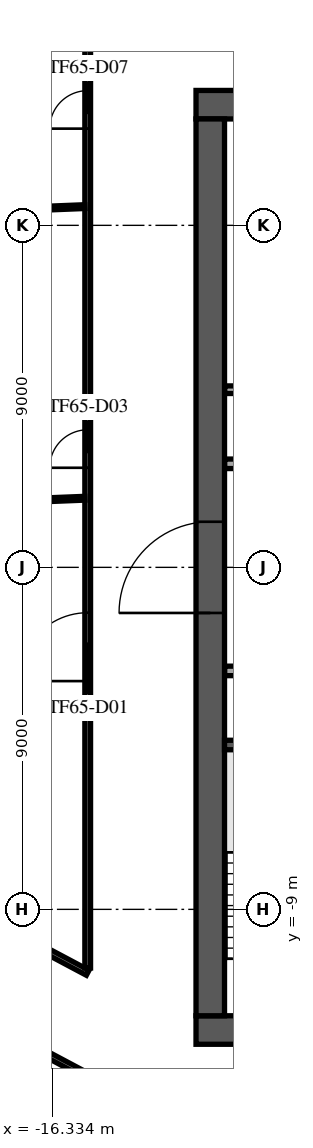
"""IFC4 building model, lengths in metres.
Left out: names, types, materials, properties, quantities, classifications, styles, units other than length and angle.
Written with IfcOpenShell. Run it as: python <this file> out.ifc"""

import sys

from ifc_helpers import new_model, si_unit, direction, frame, frame_2d, origin, place, context, subcontext, project, spatial, rectangle, extrude, element, fill, save


model = new_model("IFC4")
c1 = context("Model", 3, precision=1e-05, world=origin(), true_north=direction((0.0, 1.0)))
c2 = subcontext(c1, "Body", "Model", "MODEL_VIEW")
j1 = project(units=[si_unit("LENGTHUNIT", "METRE"), si_unit("PLANEANGLEUNIT", "RADIAN")], contexts=[c1])
p1 = place(None, origin())
s1 = spatial("IfcSite", under=j1, at=p1, CompositionType="ELEMENT")
p2 = place(p1, origin())
s2 = spatial("IfcBuilding", under=s1, at=p2, CompositionType="ELEMENT")
p3 = place(p2, frame((0.0, 0.0, 274.9)))
s3 = spatial("IfcBuildingStorey", under=s2, at=p3, CompositionType="ELEMENT", Elevation=274.9)
p4 = place(p3, frame((-12.55, 12.175, 0.0), z_axis=(0.0, 0.0, 1.0), x_axis=(1.0, 0.0, 0.0)))
e1 = element("IfcWall", 1, at=p4, inside=s3, PredefinedType="SHEAR", context=c2, shape_type="SweptSolid", body=[
    extrude(rectangle(XDim=25.1, YDim=0.75, at=frame_2d((12.55, 0.0))), origin(), (0.0, 0.0, 1.0), 3.64),
])
p5 = place(p4, frame((11.35, 0.0, 0.0)))
e2 = element("IfcOpeningElement", 2, at=p5, cuts=e1, PredefinedType="OPENING", context=c2, shape_type="SweptSolid", body=[
    extrude(rectangle(XDim=2.4, YDim=2.4, at=frame_2d((1.2, 1.2))), frame((0.0, 0.385, 0.0), z_axis=(0.0, -1.0, 0.0), x_axis=(1.0, 0.0, 0.0)), (0.0, 0.0, 1.0), 0.77),
])
p6 = place(p4, frame((22.175, 0.0, 0.0)))
e3 = element("IfcOpeningElement", 3, at=p6, cuts=e1, PredefinedType="OPENING", context=c2, shape_type="SweptSolid", body=[
    extrude(rectangle(XDim=1.2, YDim=2.1, at=frame_2d((0.6, 1.05))), frame((0.0, 0.385, 0.0), z_axis=(0.0, -1.0, 0.0), x_axis=(1.0, 0.0, 0.0)), (0.0, 0.0, 1.0), 0.77),
])
p7 = place(p4, frame((1.15, 0.0, 0.0)))
e4 = element("IfcOpeningElement", 4, at=p7, cuts=e1, PredefinedType="OPENING", context=c2, shape_type="SweptSolid", body=[
    extrude(rectangle(XDim=1.0, YDim=2.1, at=frame_2d((0.5, 1.05))), frame((0.0, 0.385, 0.0), z_axis=(0.0, -1.0, 0.0), x_axis=(1.0, 0.0, 0.0)), (0.0, 0.0, 1.0), 0.77),
])
p8 = place(p3, frame((-12.55, -12.175, 0.0), z_axis=(0.0, 0.0, 1.0), x_axis=(1.0, 0.0, 0.0)))
e5 = element("IfcWall", 5, at=p8, inside=s3, PredefinedType="SHEAR", context=c2, shape_type="SweptSolid", body=[
    extrude(rectangle(XDim=25.1, YDim=0.75, at=frame_2d((12.55, 0.0))), origin(), (0.0, 0.0, 1.0), 3.64),
])
p9 = place(p8, frame((7.45, 0.0, 0.0)))
e6 = element("IfcOpeningElement", 6, at=p9, cuts=e5, PredefinedType="OPENING", context=c2, shape_type="SweptSolid", body=[
    extrude(rectangle(XDim=2.0, YDim=2.1, at=frame_2d((1.0, 1.05))), frame((0.0, 0.385, 0.0), z_axis=(0.0, -1.0, 0.0), x_axis=(1.0, 0.0, 0.0)), (0.0, 0.0, 1.0), 0.77),
])
p10 = place(p8, frame((17.575, 0.0, 0.0)))
e7 = element("IfcOpeningElement", 7, at=p10, cuts=e5, PredefinedType="OPENING", context=c2, shape_type="SweptSolid", body=[
    extrude(rectangle(XDim=1.2, YDim=2.1, at=frame_2d((0.6, 1.05))), frame((0.0, 0.385, 0.0), z_axis=(0.0, -1.0, 0.0), x_axis=(1.0, 0.0, 0.0)), (0.0, 0.0, 1.0), 0.77),
])
p11 = place(p8, frame((1.725, 0.0, 0.0)))
e8 = element("IfcOpeningElement", 8, at=p11, cuts=e5, PredefinedType="OPENING", context=c2, shape_type="SweptSolid", body=[
    extrude(rectangle(XDim=1.2, YDim=2.1, at=frame_2d((0.6, 1.05))), frame((0.0, 0.385, 0.0), z_axis=(0.0, -1.0, 0.0), x_axis=(1.0, 0.0, 0.0)), (0.0, 0.0, 1.0), 0.77),
])
p12 = place(p8, frame((22.175, 0.0, 0.0)))
e9 = element("IfcOpeningElement", 9, at=p12, cuts=e5, PredefinedType="OPENING", context=c2, shape_type="SweptSolid", body=[
    extrude(rectangle(XDim=1.2, YDim=2.1, at=frame_2d((0.6, 1.05))), frame((0.0, 0.385, 0.0), z_axis=(0.0, -1.0, 0.0), x_axis=(1.0, 0.0, 0.0)), (0.0, 0.0, 1.0), 0.77),
])
p13 = place(p3, frame((-12.175, -11.8, 0.0), z_axis=(0.0, 0.0, 1.0), x_axis=(0.0, 1.0, 0.0)))
e10 = element("IfcWall", 10, at=p13, inside=s3, PredefinedType="SHEAR", context=c2, shape_type="SweptSolid", body=[
    extrude(rectangle(XDim=23.6, YDim=0.75, at=frame_2d((11.8, 0.0))), origin(), (0.0, 0.0, 1.0), 3.64),
])
p14 = place(p13, frame((10.6, 0.0, 0.0)))
e11 = element("IfcOpeningElement", 11, at=p14, cuts=e10, PredefinedType="OPENING", context=c2, shape_type="SweptSolid", body=[
    extrude(rectangle(XDim=2.4, YDim=2.4, at=frame_2d((1.2, 1.2))), frame((0.0, 0.385, 0.0), z_axis=(0.0, -1.0, 0.0), x_axis=(1.0, 0.0, 0.0)), (0.0, 0.0, 1.0), 0.77),
])
p15 = place(p3, frame((-8.65, -4.675, 0.0), z_axis=(0.0, 0.0, 1.0), x_axis=(-1.0, 0.0, 0.0)))
e12 = element("IfcWall", 12, at=p15, inside=s3, PredefinedType="SOLIDWALL", context=c2, shape_type="SweptSolid", body=[
    extrude(rectangle(XDim=3.15, YDim=0.25, at=frame_2d((1.575, 0.0))), origin(), (0.0, 0.0, 1.0), 3.64),
])
p16 = place(p3, frame((-11.795, -2.725, 0.0), z_axis=(0.0, 0.0, 1.0), x_axis=(1.0, 0.0, 0.0)))
e13 = element("IfcWall", 13, at=p16, inside=s3, PredefinedType="PARTITIONING", context=c2, shape_type="SweptSolid", body=[
    extrude(rectangle(XDim=14.415, YDim=0.25, at=frame_2d((7.208, 0.0))), origin(), (0.0, 0.0, 1.0), 3.64),
])
p17 = place(p16, frame((1.295, 0.0, 0.0)))
e14 = element("IfcOpeningElement", 14, at=p17, cuts=e13, PredefinedType="OPENING", context=c2, shape_type="SweptSolid", body=[
    extrude(rectangle(XDim=1.0, YDim=2.1, at=frame_2d((0.5, 1.05))), frame((0.0, 0.135, 0.0), z_axis=(0.0, -1.0, 0.0), x_axis=(1.0, 0.0, 0.0)), (0.0, 0.0, 1.0), 0.27),
])
p18 = place(p16, frame((4.42, 0.0, 0.0)))
e15 = element("IfcOpeningElement", 15, at=p18, cuts=e13, PredefinedType="OPENING", context=c2, shape_type="SweptSolid", body=[
    extrude(rectangle(XDim=1.0, YDim=2.1, at=frame_2d((0.5, 1.05))), frame((0.0, 0.135, 0.0), z_axis=(0.0, -1.0, 0.0), x_axis=(1.0, 0.0, 0.0)), (0.0, 0.0, 1.0), 0.27),
])
p19 = place(p16, frame((9.92, 0.0, 0.0)))
e16 = element("IfcOpeningElement", 16, at=p19, cuts=e13, PredefinedType="OPENING", context=c2, shape_type="SweptSolid", body=[
    extrude(rectangle(XDim=1.0, YDim=2.1, at=frame_2d((0.5, 1.05))), frame((0.0, 0.135, 0.0), z_axis=(0.0, -1.0, 0.0), x_axis=(1.0, 0.0, 0.0)), (0.0, 0.0, 1.0), 0.27),
])
p20 = place(p3, frame((-11.795, 2.725, 0.0), z_axis=(0.0, 0.0, 1.0), x_axis=(1.0, 0.0, 0.0)))
e17 = element("IfcWall", 17, at=p20, inside=s3, PredefinedType="PARTITIONING", context=c2, shape_type="SweptSolid", body=[
    extrude(rectangle(XDim=23.59, YDim=0.25, at=frame_2d((11.795, 0.0))), origin(), (0.0, 0.0, 1.0), 3.64),
])
p21 = place(p20, frame((21.345, 0.0, 0.0)))
e18 = element("IfcOpeningElement", 18, at=p21, cuts=e17, PredefinedType="OPENING", context=c2, shape_type="SweptSolid", body=[
    extrude(rectangle(XDim=0.9, YDim=2.1, at=frame_2d((0.45, 1.05))), frame((0.0, 0.135, 0.0), z_axis=(0.0, -1.0, 0.0), x_axis=(1.0, 0.0, 0.0)), (0.0, 0.0, 1.0), 0.27),
])
p22 = place(p20, frame((1.345, 0.0, 0.0)))
e19 = element("IfcOpeningElement", 19, at=p22, cuts=e17, PredefinedType="OPENING", context=c2, shape_type="SweptSolid", body=[
    extrude(rectangle(XDim=0.9, YDim=2.1, at=frame_2d((0.45, 1.05))), frame((0.0, 0.135, 0.0), z_axis=(0.0, -1.0, 0.0), x_axis=(1.0, 0.0, 0.0)), (0.0, 0.0, 1.0), 0.27),
])
p23 = place(p20, frame((4.32, 0.0, 0.0)))
e20 = element("IfcOpeningElement", 20, at=p23, cuts=e17, PredefinedType="OPENING", context=c2, shape_type="SweptSolid", body=[
    extrude(rectangle(XDim=1.2, YDim=2.1, at=frame_2d((0.6, 1.05))), frame((0.0, 0.135, 0.0), z_axis=(0.0, -1.0, 0.0), x_axis=(1.0, 0.0, 0.0)), (0.0, 0.0, 1.0), 0.27),
])
p24 = place(p20, frame((15.42, 0.0, 0.0)))
e21 = element("IfcOpeningElement", 21, at=p24, cuts=e17, PredefinedType="OPENING", context=c2, shape_type="SweptSolid", body=[
    extrude(rectangle(XDim=1.0, YDim=2.1, at=frame_2d((0.5, 1.05))), frame((0.0, 0.135, 0.0), z_axis=(0.0, -1.0, 0.0), x_axis=(1.0, 0.0, 0.0)), (0.0, 0.0, 1.0), 0.27),
])
p25 = place(p3, frame((-11.795, 4.675, 0.0), z_axis=(0.0, 0.0, 1.0), x_axis=(1.0, 0.0, 0.0)))
e22 = element("IfcWall", 22, at=p25, inside=s3, PredefinedType="PARTITIONING", context=c2, shape_type="SweptSolid", body=[
    extrude(rectangle(XDim=3.645, YDim=0.2, at=frame_2d((1.823, 0.0))), origin(), (0.0, 0.0, 1.0), 3.64),
])
p26 = place(p3, frame((-9.159, 32.618, 0.0), z_axis=(0.0, 0.0, 1.0), x_axis=(-0.469470468388, -0.88294817476, 0.0)))
e23 = element("IfcWall", 23, at=p26, inside=s3, PredefinedType="STANDARD", context=c2, shape_type="SweptSolid", body=[
    extrude(rectangle(XDim=48.843, YDim=0.6, at=frame_2d((24.422, 0.0))), origin(), (0.0, 0.0, 1.0), 3.64),
])
p27 = place(p26, frame((1.22, 0.0, 0.9)))
e24 = element("IfcOpeningElement", 24, at=p27, cuts=e23, PredefinedType="OPENING", context=c2, shape_type="SweptSolid", body=[
    extrude(rectangle(XDim=2.0, YDim=2.1, at=frame_2d((1.0, 1.05))), frame((0.0, 0.31, 0.0), z_axis=(0.0, -1.0, 0.0), x_axis=(1.0, 0.0, 0.0)), (0.0, 0.0, 1.0), 0.62),
])
p28 = place(p26, frame((5.66, 0.0, 0.9)))
e25 = element("IfcOpeningElement", 25, at=p28, cuts=e23, PredefinedType="OPENING", context=c2, shape_type="SweptSolid", body=[
    extrude(rectangle(XDim=2.0, YDim=2.1, at=frame_2d((1.0, 1.05))), frame((0.0, 0.31, 0.0), z_axis=(0.0, -1.0, 0.0), x_axis=(1.0, 0.0, 0.0)), (0.0, 0.0, 1.0), 0.62),
])
p29 = place(p26, frame((10.101, 0.0, 0.9)))
e26 = element("IfcOpeningElement", 26, at=p29, cuts=e23, PredefinedType="OPENING", context=c2, shape_type="SweptSolid", body=[
    extrude(rectangle(XDim=2.0, YDim=2.1, at=frame_2d((1.0, 1.05))), frame((0.0, 0.31, 0.0), z_axis=(0.0, -1.0, 0.0), x_axis=(1.0, 0.0, 0.0)), (0.0, 0.0, 1.0), 0.62),
])
p30 = place(p26, frame((14.541, 0.0, 0.9)))
e27 = element("IfcOpeningElement", 27, at=p30, cuts=e23, PredefinedType="OPENING", context=c2, shape_type="SweptSolid", body=[
    extrude(rectangle(XDim=2.0, YDim=2.1, at=frame_2d((1.0, 1.05))), frame((0.0, 0.31, 0.0), z_axis=(0.0, -1.0, 0.0), x_axis=(1.0, 0.0, 0.0)), (0.0, 0.0, 1.0), 0.62),
])
p31 = place(p26, frame((18.981, 0.0, 0.9)))
e28 = element("IfcOpeningElement", 28, at=p31, cuts=e23, PredefinedType="OPENING", context=c2, shape_type="SweptSolid", body=[
    extrude(rectangle(XDim=2.0, YDim=2.1, at=frame_2d((1.0, 1.05))), frame((0.0, 0.31, 0.0), z_axis=(0.0, -1.0, 0.0), x_axis=(1.0, 0.0, 0.0)), (0.0, 0.0, 1.0), 0.62),
])
p32 = place(p26, frame((23.422, 0.0, 0.9)))
e29 = element("IfcOpeningElement", 29, at=p32, cuts=e23, PredefinedType="OPENING", context=c2, shape_type="SweptSolid", body=[
    extrude(rectangle(XDim=2.0, YDim=2.1, at=frame_2d((1.0, 1.05))), frame((0.0, 0.31, 0.0), z_axis=(0.0, -1.0, 0.0), x_axis=(1.0, 0.0, 0.0)), (0.0, 0.0, 1.0), 0.62),
])
p33 = place(p26, frame((27.862, 0.0, 0.9)))
e30 = element("IfcOpeningElement", 30, at=p33, cuts=e23, PredefinedType="OPENING", context=c2, shape_type="SweptSolid", body=[
    extrude(rectangle(XDim=2.0, YDim=2.1, at=frame_2d((1.0, 1.05))), frame((0.0, 0.31, 0.0), z_axis=(0.0, -1.0, 0.0), x_axis=(1.0, 0.0, 0.0)), (0.0, 0.0, 1.0), 0.62),
])
p34 = place(p26, frame((32.302, 0.0, 0.9)))
e31 = element("IfcOpeningElement", 31, at=p34, cuts=e23, PredefinedType="OPENING", context=c2, shape_type="SweptSolid", body=[
    extrude(rectangle(XDim=2.0, YDim=2.1, at=frame_2d((1.0, 1.05))), frame((0.0, 0.31, 0.0), z_axis=(0.0, -1.0, 0.0), x_axis=(1.0, 0.0, 0.0)), (0.0, 0.0, 1.0), 0.62),
])
p35 = place(p26, frame((36.742, 0.0, 0.9)))
e32 = element("IfcOpeningElement", 32, at=p35, cuts=e23, PredefinedType="OPENING", context=c2, shape_type="SweptSolid", body=[
    extrude(rectangle(XDim=2.0, YDim=2.1, at=frame_2d((1.0, 1.05))), frame((0.0, 0.31, 0.0), z_axis=(0.0, -1.0, 0.0), x_axis=(1.0, 0.0, 0.0)), (0.0, 0.0, 1.0), 0.62),
])
p36 = place(p26, frame((41.183, 0.0, 0.9)))
e33 = element("IfcOpeningElement", 33, at=p36, cuts=e23, PredefinedType="OPENING", context=c2, shape_type="SweptSolid", body=[
    extrude(rectangle(XDim=2.0, YDim=2.1, at=frame_2d((1.0, 1.05))), frame((0.0, 0.31, 0.0), z_axis=(0.0, -1.0, 0.0), x_axis=(1.0, 0.0, 0.0)), (0.0, 0.0, 1.0), 0.62),
])
p37 = place(p26, frame((45.623, 0.0, 0.9)))
e34 = element("IfcOpeningElement", 34, at=p37, cuts=e23, PredefinedType="OPENING", context=c2, shape_type="SweptSolid", body=[
    extrude(rectangle(XDim=2.0, YDim=2.1, at=frame_2d((1.0, 1.05))), frame((0.0, 0.31, 0.0), z_axis=(0.0, -1.0, 0.0), x_axis=(1.0, 0.0, 0.0)), (0.0, 0.0, 1.0), 0.62),
])
p38 = place(p3, frame((-26.271, -7.606, 0.0), z_axis=(0.0, 0.0, 1.0), x_axis=(0.882946860375, -0.469472940385, 0.0)))
e35 = element("IfcWall", 35, at=p38, inside=s3, PredefinedType="PARTITIONING", context=c2, shape_type="SweptSolid", body=[
    extrude(rectangle(XDim=39.325, YDim=0.15, at=frame_2d((19.662, 0.0))), origin(), (0.0, 0.0, 1.0), 3.04),
])
p39 = place(p38, frame((2.8, 0.0, 0.0)))
e36 = element("IfcOpeningElement", 36, at=p39, cuts=e35, PredefinedType="OPENING", context=c2, shape_type="SweptSolid", body=[
    extrude(rectangle(XDim=1.0, YDim=2.1, at=frame_2d((0.5, 1.05))), frame((0.0, 0.085, 0.0), z_axis=(0.0, -1.0, 0.0), x_axis=(1.0, 0.0, 0.0)), (0.0, 0.0, 1.0), 0.17),
])
p40 = place(p38, frame((6.915, 0.0, 0.0)))
e37 = element("IfcOpeningElement", 37, at=p40, cuts=e35, PredefinedType="OPENING", context=c2, shape_type="SweptSolid", body=[
    extrude(rectangle(XDim=1.0, YDim=2.1, at=frame_2d((0.5, 1.05))), frame((0.0, 0.085, 0.0), z_axis=(0.0, -1.0, 0.0), x_axis=(1.0, 0.0, 0.0)), (0.0, 0.0, 1.0), 0.17),
])
p41 = place(p38, frame((14.499, 0.0, 0.0)))
e38 = element("IfcOpeningElement", 38, at=p41, cuts=e35, PredefinedType="OPENING", context=c2, shape_type="SweptSolid", body=[
    extrude(rectangle(XDim=1.0, YDim=2.1, at=frame_2d((0.5, 1.05))), frame((0.0, 0.085, 0.0), z_axis=(0.0, -1.0, 0.0), x_axis=(1.0, 0.0, 0.0)), (0.0, 0.0, 1.0), 0.17),
])
p42 = place(p38, frame((25.785, 0.0, 0.0)))
e39 = element("IfcOpeningElement", 39, at=p42, cuts=e35, PredefinedType="OPENING", context=c2, shape_type="SweptSolid", body=[
    extrude(rectangle(XDim=1.0, YDim=2.1, at=frame_2d((0.5, 1.05))), frame((0.0, 0.085, 0.0), z_axis=(0.0, -1.0, 0.0), x_axis=(1.0, 0.0, 0.0)), (0.0, 0.0, 1.0), 0.17),
])
p43 = place(p38, frame((37.741, 0.0, 0.0)))
e40 = element("IfcOpeningElement", 40, at=p43, cuts=e35, PredefinedType="OPENING", context=c2, shape_type="SweptSolid", body=[
    extrude(rectangle(XDim=1.0, YDim=2.1, at=frame_2d((0.5, 1.05))), frame((0.0, 0.085, 0.0), z_axis=(0.0, -1.0, 0.0), x_axis=(1.0, 0.0, 0.0)), (0.0, 0.0, 1.0), 0.17),
])
p44 = place(p3, frame((-25.144, -5.487, 0.0), z_axis=(0.0, 0.0, 1.0), x_axis=(0.882957268676, -0.469453364769, 0.0)))
e41 = element("IfcWall", 41, at=p44, inside=s3, PredefinedType="PARTITIONING", context=c2, shape_type="SweptSolid", body=[
    extrude(rectangle(XDim=11.036, YDim=0.15, at=frame_2d((5.518, 0.0))), origin(), (0.0, 0.0, 1.0), 3.24),
])
p45 = place(p3, frame((-15.4, -10.543, 0.0), z_axis=(0.0, 0.0, 1.0), x_axis=(0.0, 1.0, 0.0)))
e42 = element("IfcWall", 42, at=p45, inside=s3, PredefinedType="PARTITIONING", context=c2, shape_type="SweptSolid", body=[
    extrude(rectangle(XDim=25.943, YDim=0.15, at=frame_2d((12.972, 0.0))), origin(), (0.0, 0.0, 1.0), 3.24),
])
p46 = place(p45, frame((7.55, 0.0, 0.0)))
e43 = element("IfcOpeningElement", 43, at=p46, cuts=e42, PredefinedType="OPENING", context=c2, shape_type="SweptSolid", body=[
    extrude(rectangle(XDim=1.8, YDim=2.1, at=frame_2d((0.9, 1.05))), frame((0.0, 0.085, 0.0), z_axis=(0.0, -1.0, 0.0), x_axis=(1.0, 0.0, 0.0)), (0.0, 0.0, 1.0), 0.17),
])
p47 = place(p45, frame((13.164, 0.0, 0.0)))
e44 = element("IfcOpeningElement", 44, at=p47, cuts=e42, PredefinedType="OPENING", context=c2, shape_type="SweptSolid", body=[
    extrude(rectangle(XDim=1.0, YDim=2.1, at=frame_2d((0.5, 1.05))), frame((0.0, 0.085, 0.0), z_axis=(0.0, -1.0, 0.0), x_axis=(1.0, 0.0, 0.0)), (0.0, 0.0, 1.0), 0.17),
])
p48 = place(p45, frame((22.088, 0.0, 0.0)))
e45 = element("IfcOpeningElement", 45, at=p48, cuts=e42, PredefinedType="OPENING", context=c2, shape_type="SweptSolid", body=[
    extrude(rectangle(XDim=1.0, YDim=2.1, at=frame_2d((0.5, 1.05))), frame((0.0, 0.085, 0.0), z_axis=(0.0, -1.0, 0.0), x_axis=(1.0, 0.0, 0.0)), (0.0, 0.0, 1.0), 0.17),
])
p49 = place(p3, frame((-25.404, 1.422, 0.0), z_axis=(0.0, 0.0, 1.0), x_axis=(0.999201390474, 0.039957243081, 0.0)))
e46 = element("IfcWall", 46, at=p49, inside=s3, PredefinedType="PARTITIONING", context=c2, shape_type="SweptSolid", body=[
    extrude(rectangle(XDim=9.935, YDim=0.1, at=frame_2d((4.967, 0.0))), origin(), (0.0, 0.0, 1.0), 3.04),
])
p50 = place(p3, frame((-21.235, 9.263, 0.0), z_axis=(0.0, 0.0, 1.0), x_axis=(0.999203325676, 0.039908820555, 0.0)))
e47 = element("IfcWall", 47, at=p50, inside=s3, PredefinedType="PARTITIONING", context=c2, shape_type="SweptSolid", body=[
    extrude(rectangle(XDim=5.763, YDim=0.1, at=frame_2d((2.881, 0.0))), origin(), (0.0, 0.0, 1.0), 3.04),
])
p51 = place(p14, origin())
e48 = element("IfcDoor", 48, at=p51, inside=s3, OperationType="SINGLE_SWING_LEFT", PredefinedType="DOOR", context=c2, shape_type="SweptSolid", body=[
    extrude(rectangle(XDim=2.4, YDim=2.4, at=frame_2d((1.2, 1.2))), frame((0.0, 0.025, 0.0), z_axis=(0.0, -1.0, 0.0), x_axis=(1.0, 0.0, 0.0)), (0.0, 0.0, 1.0), 0.05),
])
fill(e11, e48)
p52 = place(p46, origin())
e49 = element("IfcDoor", 49, at=p52, inside=s3, OperationType="DOUBLE_DOOR_SINGLE_SWING", PredefinedType="DOOR", context=c2, shape_type="SweptSolid", body=[
    extrude(rectangle(XDim=1.8, YDim=2.1, at=frame_2d((0.9, 1.05))), frame((0.0, 0.025, 0.0), z_axis=(0.0, -1.0, 0.0), x_axis=(1.0, 0.0, 0.0)), (0.0, 0.0, 1.0), 0.05),
])
fill(e43, e49)
p53 = place(p47, origin())
e50 = element("IfcDoor", 50, at=p53, inside=s3, OperationType="SINGLE_SWING_RIGHT", PredefinedType="DOOR", context=c2, shape_type="SweptSolid", body=[
    extrude(rectangle(XDim=1.0, YDim=2.1, at=frame_2d((0.5, 1.05))), frame((0.0, 0.025, 0.0), z_axis=(0.0, -1.0, 0.0), x_axis=(1.0, 0.0, 0.0)), (0.0, 0.0, 1.0), 0.05),
])
fill(e44, e50)
p54 = place(p48, origin())
e51 = element("IfcDoor", 51, at=p54, inside=s3, OperationType="SINGLE_SWING_LEFT", PredefinedType="DOOR", context=c2, shape_type="SweptSolid", body=[
    extrude(rectangle(XDim=1.0, YDim=2.1, at=frame_2d((0.5, 1.05))), frame((0.0, 0.025, 0.0), z_axis=(0.0, -1.0, 0.0), x_axis=(1.0, 0.0, 0.0)), (0.0, 0.0, 1.0), 0.05),
])
fill(e45, e51)
save(model, sys.argv[1])
